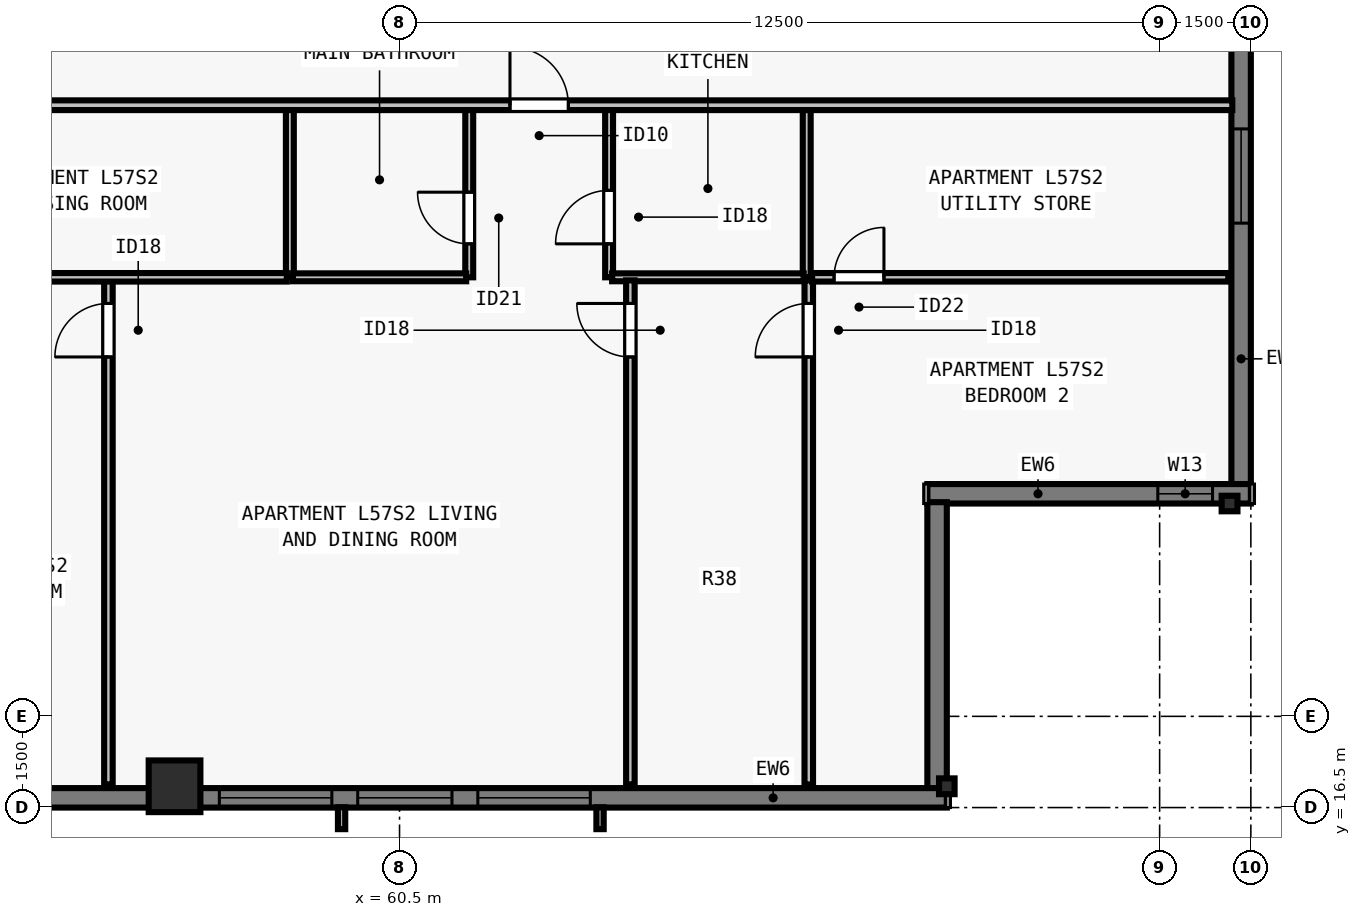
"""IFC4 building model, lengths in metres.
Left out: names, types, materials, properties, quantities, classifications, styles, units other than length and angle.
Written with IfcOpenShell. Run it as: python <this file> out.ifc"""

import sys

from ifc_helpers import new_model, si_unit, direction, frame, frame_2d, origin, origin_2d, place, context, subcontext, project, spatial, rectangle, i_section, extrude, element, fill, save


model = new_model("IFC4")
c1 = context("Model", 3, precision=1e-05, world=origin(), true_north=direction((0.0, 1.0)))
c2 = subcontext(c1, "Body", "Model", "MODEL_VIEW")
j1 = project(units=[si_unit("LENGTHUNIT", "METRE"), si_unit("PLANEANGLEUNIT", "RADIAN")], contexts=[c1])
p1 = place(None, origin())
s1 = spatial("IfcSite", under=j1, at=p1, CompositionType="ELEMENT")
p2 = place(p1, origin())
s2 = spatial("IfcBuilding", under=s1, at=p2, CompositionType="ELEMENT")
p3 = place(p2, frame((0.0, 0.0, 209.5)))
s3 = spatial("IfcBuildingStorey", under=s2, at=p3, CompositionType="ELEMENT", Elevation=209.5)
p4 = place(p3, frame((56.8, 16.85, 0.0), z_axis=(0.0, 0.0, 1.0), x_axis=(1.0, 0.0, 0.0)))
e1 = element("IfcColumn", 1, at=p4, inside=s3, PredefinedType="COLUMN", context=c2, shape_type="SweptSolid", body=[
    extrude(rectangle(XDim=0.85, YDim=0.85, at=origin_2d()), origin(), (0.0, 0.0, 1.0), 3.5),
])
for number, where, z_axis, x_axis in (
    (2, (69.5, 16.85, 0.0), (0.0, 0.0, 1.0), (1.0, 0.0, 0.0)),
    (3, (74.15, 21.5, 0.0), (0.0, 0.0, 1.0), (0.0, 1.0, 0.0)),
):
    element("IfcColumn", number, at=place(p3, frame(where, z_axis=z_axis, x_axis=x_axis)), inside=s3, PredefinedType="COLUMN", context=c2, shape_type="SweptSolid", body=[
        extrude(i_section(OverallWidth=0.256, OverallDepth=0.26, WebThickness=0.01, FlangeThickness=0.017, FilletRadius=0.013, at=origin_2d()), origin(), (0.0, 0.0, 1.0), 3.5),
    ])
p5 = place(p3, frame((74.34, 56.5, 0.0), z_axis=(0.0, 0.0, 1.0), x_axis=(0.0, -1.0, 0.0)))
e4 = element("IfcWall", 4, at=p5, inside=s3, PredefinedType="SOLIDWALL", context=c2, shape_type="SweptSolid", body=[
    extrude(rectangle(XDim=34.702, YDim=0.32, at=frame_2d((17.351, 0.0))), origin(), (0.0, 0.0, 1.0), 3.29),
])
p6 = place(p5, frame((4.163, 0.0, 0.8)))
e5 = element("IfcOpeningElement", 5, at=p6, cuts=e4, PredefinedType="OPENING", context=c2, shape_type="SweptSolid", body=[
    extrude(rectangle(XDim=1.85, YDim=1.678, at=frame_2d((0.925, 0.839))), frame((0.0, 0.17, 0.0), z_axis=(0.0, -1.0, 0.0), x_axis=(1.0, 0.0, 0.0)), (0.0, 0.0, 1.0), 0.34),
])
p7 = place(p5, frame((6.888, 0.0, 0.8)))
e6 = element("IfcOpeningElement", 6, at=p7, cuts=e4, PredefinedType="OPENING", context=c2, shape_type="SweptSolid", body=[
    extrude(rectangle(XDim=1.55, YDim=1.678, at=frame_2d((0.775, 0.839))), frame((0.0, 0.17, 0.0), z_axis=(0.0, -1.0, 0.0), x_axis=(1.0, 0.0, 0.0)), (0.0, 0.0, 1.0), 0.34),
])
p8 = place(p5, frame((10.113, 0.0, 0.8)))
e7 = element("IfcOpeningElement", 7, at=p8, cuts=e4, PredefinedType="OPENING", context=c2, shape_type="SweptSolid", body=[
    extrude(rectangle(XDim=1.85, YDim=1.678, at=frame_2d((0.925, 0.839))), frame((0.0, 0.17, 0.0), z_axis=(0.0, -1.0, 0.0), x_axis=(1.0, 0.0, 0.0)), (0.0, 0.0, 1.0), 0.34),
])
p9 = place(p5, frame((14.888, 0.0, 0.8)))
e8 = element("IfcOpeningElement", 8, at=p9, cuts=e4, PredefinedType="OPENING", context=c2, shape_type="SweptSolid", body=[
    extrude(rectangle(XDim=1.55, YDim=1.678, at=frame_2d((0.775, 0.839))), frame((0.0, 0.17, 0.0), z_axis=(0.0, -1.0, 0.0), x_axis=(1.0, 0.0, 0.0)), (0.0, 0.0, 1.0), 0.34),
])
p10 = place(p5, frame((18.114, 0.0, 0.8)))
e9 = element("IfcOpeningElement", 9, at=p10, cuts=e4, PredefinedType="OPENING", context=c2, shape_type="SweptSolid", body=[
    extrude(rectangle(XDim=1.85, YDim=1.678, at=frame_2d((0.925, 0.839))), frame((0.0, 0.17, 0.0), z_axis=(0.0, -1.0, 0.0), x_axis=(1.0, 0.0, 0.0)), (0.0, 0.0, 1.0), 0.34),
])
p11 = place(p5, frame((23.614, 0.0, 0.8)))
e10 = element("IfcOpeningElement", 10, at=p11, cuts=e4, PredefinedType="OPENING", context=c2, shape_type="SweptSolid", body=[
    extrude(rectangle(XDim=1.85, YDim=1.678, at=frame_2d((0.925, 0.839))), frame((0.0, 0.17, 0.0), z_axis=(0.0, -1.0, 0.0), x_axis=(1.0, 0.0, 0.0)), (0.0, 0.0, 1.0), 0.34),
])
p12 = place(p5, frame((28.839, 0.0, 0.8)))
e11 = element("IfcOpeningElement", 11, at=p12, cuts=e4, PredefinedType="OPENING", context=c2, shape_type="SweptSolid", body=[
    extrude(rectangle(XDim=1.55, YDim=1.678, at=frame_2d((0.775, 0.839))), frame((0.0, 0.17, 0.0), z_axis=(0.0, -1.0, 0.0), x_axis=(1.0, 0.0, 0.0)), (0.0, 0.0, 1.0), 0.34),
])
p13 = place(p3, frame((74.5, 21.66, 0.0), z_axis=(0.0, 0.0, 1.0), x_axis=(-1.0, 0.0, 0.0)))
e12 = element("IfcWall", 12, at=p13, inside=s3, PredefinedType="SOLIDWALL", context=c2, shape_type="SweptSolid", body=[
    extrude(rectangle(XDim=5.32, YDim=0.32, at=frame_2d((2.66, 0.0))), origin(), (0.0, 0.0, 1.0), 3.29),
])
p14 = place(p13, frame((0.63, 0.0, 0.8)))
e13 = element("IfcOpeningElement", 13, at=p14, cuts=e12, PredefinedType="OPENING", context=c2, shape_type="SweptSolid", body=[
    extrude(rectangle(XDim=0.9, YDim=1.678, at=frame_2d((0.45, 0.839))), frame((0.0, 0.17, 0.0), z_axis=(0.0, -1.0, 0.0), x_axis=(1.0, 0.0, 0.0)), (0.0, 0.0, 1.0), 0.34),
])
p15 = place(p3, frame((69.34, 21.522, 0.0), z_axis=(0.0, 0.0, 1.0), x_axis=(0.0, -1.0, 0.0)))
e14 = element("IfcWall", 14, at=p15, inside=s3, PredefinedType="SOLIDWALL", context=c2, shape_type="SweptSolid", body=[
    extrude(rectangle(XDim=4.724, YDim=0.32, at=frame_2d((2.362, 0.0))), origin(), (0.0, 0.0, 1.0), 3.29),
])
p16 = place(p3, frame((69.5, 16.66, 0.0), z_axis=(0.0, 0.0, 1.0), x_axis=(-1.0, 0.0, 0.0)))
e15 = element("IfcWall", 15, at=p16, inside=s3, PredefinedType="SOLIDWALL", context=c2, shape_type="SweptSolid", body=[
    extrude(rectangle(XDim=34.702, YDim=0.32, at=frame_2d((17.351, 0.0))), origin(), (0.0, 0.0, 1.0), 3.29),
])
p17 = place(p16, frame((5.863, 0.0, 0.8)))
e16 = element("IfcOpeningElement", 16, at=p17, cuts=e15, PredefinedType="OPENING", context=c2, shape_type="SweptSolid", body=[
    extrude(rectangle(XDim=1.85, YDim=1.678, at=frame_2d((0.925, 0.839))), frame((0.0, 0.17, 0.0), z_axis=(0.0, -1.0, 0.0), x_axis=(1.0, 0.0, 0.0)), (0.0, 0.0, 1.0), 0.34),
])
p18 = place(p16, frame((8.138, 0.0, 0.8)))
e17 = element("IfcOpeningElement", 17, at=p18, cuts=e15, PredefinedType="OPENING", context=c2, shape_type="SweptSolid", body=[
    extrude(rectangle(XDim=1.55, YDim=1.678, at=frame_2d((0.775, 0.839))), frame((0.0, 0.17, 0.0), z_axis=(0.0, -1.0, 0.0), x_axis=(1.0, 0.0, 0.0)), (0.0, 0.0, 1.0), 0.34),
])
p19 = place(p16, frame((10.113, 0.0, 0.8)))
e18 = element("IfcOpeningElement", 18, at=p19, cuts=e15, PredefinedType="OPENING", context=c2, shape_type="SweptSolid", body=[
    extrude(rectangle(XDim=1.85, YDim=1.678, at=frame_2d((0.925, 0.839))), frame((0.0, 0.17, 0.0), z_axis=(0.0, -1.0, 0.0), x_axis=(1.0, 0.0, 0.0)), (0.0, 0.0, 1.0), 0.34),
])
p20 = place(p16, frame((14.888, 0.0, 0.8)))
e19 = element("IfcOpeningElement", 19, at=p20, cuts=e15, PredefinedType="OPENING", context=c2, shape_type="SweptSolid", body=[
    extrude(rectangle(XDim=1.55, YDim=1.678, at=frame_2d((0.775, 0.839))), frame((0.0, 0.17, 0.0), z_axis=(0.0, -1.0, 0.0), x_axis=(1.0, 0.0, 0.0)), (0.0, 0.0, 1.0), 0.34),
])
p21 = place(p16, frame((18.564, 0.0, 0.8)))
e20 = element("IfcOpeningElement", 20, at=p21, cuts=e15, PredefinedType="OPENING", context=c2, shape_type="SweptSolid", body=[
    extrude(rectangle(XDim=1.85, YDim=1.678, at=frame_2d((0.925, 0.839))), frame((0.0, 0.17, 0.0), z_axis=(0.0, -1.0, 0.0), x_axis=(1.0, 0.0, 0.0)), (0.0, 0.0, 1.0), 0.34),
])
p22 = place(p16, frame((24.414, 0.0, 0.8)))
e21 = element("IfcOpeningElement", 21, at=p22, cuts=e15, PredefinedType="OPENING", context=c2, shape_type="SweptSolid", body=[
    extrude(rectangle(XDim=1.85, YDim=1.678, at=frame_2d((0.925, 0.839))), frame((0.0, 0.17, 0.0), z_axis=(0.0, -1.0, 0.0), x_axis=(1.0, 0.0, 0.0)), (0.0, 0.0, 1.0), 0.34),
])
p23 = place(p16, frame((28.389, 0.0, 0.8)))
e22 = element("IfcOpeningElement", 22, at=p23, cuts=e15, PredefinedType="OPENING", context=c2, shape_type="SweptSolid", body=[
    extrude(rectangle(XDim=1.55, YDim=1.678, at=frame_2d((0.775, 0.839))), frame((0.0, 0.17, 0.0), z_axis=(0.0, -1.0, 0.0), x_axis=(1.0, 0.0, 0.0)), (0.0, 0.0, 1.0), 0.34),
])
p24 = place(p3, frame((29.805, 28.05, 0.0), z_axis=(0.0, 0.0, 1.0), x_axis=(1.0, 0.0, 0.0)))
e23 = element("IfcWall", 23, at=p24, inside=s3, PredefinedType="PARTITIONING", context=c2, shape_type="SweptSolid", body=[
    extrude(rectangle(XDim=44.39, YDim=0.16, at=frame_2d((22.195, 0.0))), origin(), (0.0, 0.0, 1.0), 2.958),
])
p25 = place(p24, frame((10.431, 0.0, 0.0)))
e24 = element("IfcOpeningElement", 24, at=p25, cuts=e23, PredefinedType="OPENING", context=c2, shape_type="SweptSolid", body=[
    extrude(rectangle(XDim=0.96, YDim=2.18, at=frame_2d((0.48, 1.09))), frame((0.0, 0.09, 0.0), z_axis=(0.0, -1.0, 0.0), x_axis=(1.0, 0.0, 0.0)), (0.0, 0.0, 1.0), 0.18),
])
p26 = place(p24, frame((32.511, 0.0, 0.0)))
e25 = element("IfcOpeningElement", 25, at=p26, cuts=e23, PredefinedType="OPENING", context=c2, shape_type="SweptSolid", body=[
    extrude(rectangle(XDim=0.96, YDim=2.18, at=frame_2d((0.48, 1.09))), frame((0.0, 0.09, 0.0), z_axis=(0.0, -1.0, 0.0), x_axis=(1.0, 0.0, 0.0)), (0.0, 0.0, 1.0), 0.18),
])
p27 = place(p3, frame((58.696, 25.22, 0.0), z_axis=(0.0, 0.0, 1.0), x_axis=(0.0, 1.0, 0.0)))
e26 = element("IfcWall", 26, at=p27, inside=s3, PredefinedType="PLUMBINGWALL", context=c2, shape_type="SweptSolid", body=[
    extrude(rectangle(XDim=2.75, YDim=0.13, at=frame_2d((1.375, 0.0))), origin(), (0.0, 0.0, 1.0), 3.29),
])
p28 = place(p3, frame((61.646, 25.22, 0.0), z_axis=(0.0, 0.0, 1.0), x_axis=(0.0, 1.0, 0.0)))
e27 = element("IfcWall", 27, at=p28, inside=s3, PredefinedType="PLUMBINGWALL", context=c2, shape_type="SweptSolid", body=[
    extrude(rectangle(XDim=2.75, YDim=0.13, at=frame_2d((1.375, 0.0))), origin(), (0.0, 0.0, 1.0), 3.29),
])
p29 = place(p28, frame((0.55, 0.0, 0.0)))
e28 = element("IfcOpeningElement", 28, at=p29, cuts=e27, PredefinedType="OPENING", context=c2, shape_type="SweptSolid", body=[
    extrude(rectangle(XDim=0.85, YDim=2.08, at=frame_2d((0.425, 1.04))), frame((0.0, 0.075, 0.0), z_axis=(0.0, -1.0, 0.0), x_axis=(1.0, 0.0, 0.0)), (0.0, 0.0, 1.0), 0.15),
])
p30 = place(p3, frame((58.746, 25.22, 0.0), z_axis=(0.0, 0.0, 1.0), x_axis=(1.0, 0.0, 0.0)))
e29 = element("IfcWall", 29, at=p30, inside=s3, PredefinedType="PLUMBINGWALL", context=c2, shape_type="SweptSolid", body=[
    extrude(rectangle(XDim=2.85, YDim=0.13, at=frame_2d((1.425, 0.0))), origin(), (0.0, 0.0, 1.0), 3.29),
])
p31 = place(p3, frame((67.196, 25.22, 0.0), z_axis=(0.0, 0.0, 1.0), x_axis=(0.0, 1.0, 0.0)))
e30 = element("IfcWall", 30, at=p31, inside=s3, PredefinedType="PLUMBINGWALL", context=c2, shape_type="SweptSolid", body=[
    extrude(rectangle(XDim=2.75, YDim=0.13, at=frame_2d((1.375, 0.0))), origin(), (0.0, 0.0, 1.0), 3.29),
])
p32 = place(p3, frame((63.946, 25.22, 0.0), z_axis=(0.0, 0.0, 1.0), x_axis=(0.0, 1.0, 0.0)))
e31 = element("IfcWall", 31, at=p32, inside=s3, PredefinedType="PLUMBINGWALL", context=c2, shape_type="SweptSolid", body=[
    extrude(rectangle(XDim=2.75, YDim=0.13, at=frame_2d((1.375, 0.0))), origin(), (0.0, 0.0, 1.0), 2.573),
])
p33 = place(p32, frame((0.55, 0.0, 0.0)))
e32 = element("IfcOpeningElement", 32, at=p33, cuts=e31, PredefinedType="OPENING", context=c2, shape_type="SweptSolid", body=[
    extrude(rectangle(XDim=0.88, YDim=2.1, at=frame_2d((0.44, 1.05))), frame((0.0, 0.075, 0.0), z_axis=(0.0, -1.0, 0.0), x_axis=(1.0, 0.0, 0.0)), (0.0, 0.0, 1.0), 0.15),
])
p34 = place(p3, frame((63.996, 25.22, 0.0), z_axis=(0.0, 0.0, 1.0), x_axis=(1.0, 0.0, 0.0)))
e33 = element("IfcWall", 33, at=p34, inside=s3, PredefinedType="PLUMBINGWALL", context=c2, shape_type="SweptSolid", body=[
    extrude(rectangle(XDim=3.15, YDim=0.13, at=frame_2d((1.575, 0.0))), origin(), (0.0, 0.0, 1.0), 3.29),
])
p35 = place(p3, frame((55.712, 16.88, 0.0), z_axis=(0.0, 0.0, 1.0), x_axis=(0.0, 1.0, 0.0)))
e34 = element("IfcWall", 34, at=p35, inside=s3, PredefinedType="PARTITIONING", context=c2, shape_type="SweptSolid", body=[
    extrude(rectangle(XDim=8.38, YDim=0.14, at=frame_2d((4.19, 0.0))), origin(), (0.0, 0.0, 1.0), 3.29),
])
p36 = place(p35, frame((7.03, 0.0, 0.0)))
e35 = element("IfcOpeningElement", 35, at=p36, cuts=e34, PredefinedType="OPENING", context=c2, shape_type="SweptSolid", body=[
    extrude(rectangle(XDim=0.88, YDim=2.1, at=frame_2d((0.44, 1.05))), frame((0.0, 0.08, 0.0), z_axis=(0.0, -1.0, 0.0), x_axis=(1.0, 0.0, 0.0)), (0.0, 0.0, 1.0), 0.16),
])
p37 = place(p3, frame((51.577, 25.22, 0.0), z_axis=(0.0, 0.0, 1.0), x_axis=(1.0, 0.0, 0.0)))
e36 = element("IfcWall", 36, at=p37, inside=s3, PredefinedType="PARTITIONING", context=c2, shape_type="SweptSolid", body=[
    extrude(rectangle(XDim=7.069, YDim=0.14, at=frame_2d((3.534, 0.0))), origin(), (0.0, 0.0, 1.0), 3.29),
])
p38 = place(p37, frame((0.335, 0.0, 0.0)))
e37 = element("IfcOpeningElement", 37, at=p38, cuts=e36, PredefinedType="OPENING", context=c2, shape_type="SweptSolid", body=[
    extrude(rectangle(XDim=0.82, YDim=2.1, at=frame_2d((0.41, 1.05))), frame((0.0, 0.08, 0.0), z_axis=(0.0, -1.0, 0.0), x_axis=(1.0, 0.0, 0.0)), (0.0, 0.0, 1.0), 0.16),
])
p39 = place(p3, frame((67.23, 16.88, 0.0), z_axis=(0.0, 0.0, 1.0), x_axis=(0.0, 1.0, 0.0)))
e38 = element("IfcWall", 38, at=p39, inside=s3, PredefinedType="PARTITIONING", context=c2, shape_type="SweptSolid", body=[
    extrude(rectangle(XDim=8.29, YDim=0.14, at=frame_2d((4.145, 0.0))), origin(), (0.0, 0.0, 1.0), 2.573),
])
p40 = place(p39, frame((7.03, 0.0, 0.0)))
e39 = element("IfcOpeningElement", 39, at=p40, cuts=e38, PredefinedType="OPENING", context=c2, shape_type="SweptSolid", body=[
    extrude(rectangle(XDim=0.88, YDim=2.1, at=frame_2d((0.44, 1.05))), frame((0.0, 0.08, 0.0), z_axis=(0.0, -1.0, 0.0), x_axis=(1.0, 0.0, 0.0)), (0.0, 0.0, 1.0), 0.16),
])
p41 = place(p3, frame((67.285, 25.22, 0.0), z_axis=(0.0, 0.0, 1.0), x_axis=(1.0, 0.0, 0.0)))
e40 = element("IfcWall", 40, at=p41, inside=s3, PredefinedType="PARTITIONING", context=c2, shape_type="SweptSolid", body=[
    extrude(rectangle(XDim=6.845, YDim=0.14, at=frame_2d((3.422, 0.0))), origin(), (0.0, 0.0, 1.0), 2.958),
])
p42 = place(p41, frame((0.361, 0.0, 0.0)))
e41 = element("IfcOpeningElement", 41, at=p42, cuts=e40, PredefinedType="OPENING", context=c2, shape_type="SweptSolid", body=[
    extrude(rectangle(XDim=0.82, YDim=2.1, at=frame_2d((0.41, 1.05))), frame((0.0, 0.08, 0.0), z_axis=(0.0, -1.0, 0.0), x_axis=(1.0, 0.0, 0.0)), (0.0, 0.0, 1.0), 0.16),
])
p43 = place(p3, frame((64.296, 16.88, 0.0), z_axis=(0.0, 0.0, 1.0), x_axis=(0.0, 1.0, 0.0)))
e42 = element("IfcWall", 42, at=p43, inside=s3, PredefinedType="PARTITIONING", context=c2, shape_type="SweptSolid", body=[
    extrude(rectangle(XDim=8.29, YDim=0.14, at=frame_2d((4.145, 0.0))), origin(), (0.0, 0.0, 1.0), 2.573),
])
p44 = place(p43, frame((7.03, 0.0, 0.0)))
e43 = element("IfcOpeningElement", 43, at=p44, cuts=e42, PredefinedType="OPENING", context=c2, shape_type="SweptSolid", body=[
    extrude(rectangle(XDim=0.88, YDim=2.1, at=frame_2d((0.44, 1.05))), frame((0.0, 0.08, 0.0), z_axis=(0.0, -1.0, 0.0), x_axis=(1.0, 0.0, 0.0)), (0.0, 0.0, 1.0), 0.16),
])
p45 = place(p12, origin())
e44 = element("IfcWindow", 44, at=p45, inside=s3, PartitioningType="SINGLE_PANEL", PredefinedType="WINDOW", context=c2, shape_type="SweptSolid", body=[
    extrude(rectangle(XDim=1.55, YDim=1.678, at=frame_2d((0.775, 0.839))), frame((0.0, -0.05, 0.0), z_axis=(0.0, -1.0, 0.0), x_axis=(1.0, 0.0, 0.0)), (0.0, 0.0, 1.0), 0.06),
])
fill(e11, e44)
p46 = place(p17, origin())
e45 = element("IfcWindow", 45, at=p46, inside=s3, PartitioningType="SINGLE_PANEL", PredefinedType="WINDOW", context=c2, shape_type="SweptSolid", body=[
    extrude(rectangle(XDim=1.85, YDim=1.678, at=frame_2d((0.925, 0.839))), frame((0.0, -0.05, 0.0), z_axis=(0.0, -1.0, 0.0), x_axis=(1.0, 0.0, 0.0)), (0.0, 0.0, 1.0), 0.06),
])
fill(e16, e45)
p47 = place(p18, origin())
e46 = element("IfcWindow", 46, at=p47, inside=s3, PartitioningType="SINGLE_PANEL", PredefinedType="WINDOW", context=c2, shape_type="SweptSolid", body=[
    extrude(rectangle(XDim=1.55, YDim=1.678, at=frame_2d((0.775, 0.839))), frame((0.0, -0.05, 0.0), z_axis=(0.0, -1.0, 0.0), x_axis=(1.0, 0.0, 0.0)), (0.0, 0.0, 1.0), 0.06),
])
fill(e17, e46)
p48 = place(p19, origin())
e47 = element("IfcWindow", 47, at=p48, inside=s3, PartitioningType="SINGLE_PANEL", PredefinedType="WINDOW", context=c2, shape_type="SweptSolid", body=[
    extrude(rectangle(XDim=1.85, YDim=1.678, at=frame_2d((0.925, 0.839))), frame((0.0, -0.05, 0.0), z_axis=(0.0, -1.0, 0.0), x_axis=(1.0, 0.0, 0.0)), (0.0, 0.0, 1.0), 0.06),
])
fill(e18, e47)
p49 = place(p14, origin())
e48 = element("IfcWindow", 48, at=p49, inside=s3, PartitioningType="SINGLE_PANEL", PredefinedType="WINDOW", context=c2, shape_type="SweptSolid", body=[
    extrude(rectangle(XDim=0.9, YDim=1.678, at=frame_2d((0.45, 0.839))), frame((0.0, -0.04, 0.0), z_axis=(0.0, -1.0, 0.0), x_axis=(1.0, 0.0, 0.0)), (0.0, 0.0, 1.0), 0.06),
])
fill(e13, e48)
p50 = place(p29, origin())
e49 = element("IfcDoor", 49, at=p50, inside=s3, OperationType="SINGLE_SWING_RIGHT", PredefinedType="DOOR", context=c2, shape_type="SweptSolid", body=[
    extrude(rectangle(XDim=0.85, YDim=2.08, at=frame_2d((0.425, 1.04))), frame((0.0, 0.025, 0.0), z_axis=(0.0, -1.0, 0.0), x_axis=(1.0, 0.0, 0.0)), (0.0, 0.0, 1.0), 0.05),
])
fill(e28, e49)
p51 = place(p33, origin())
e50 = element("IfcDoor", 50, at=p51, inside=s3, OperationType="SINGLE_SWING_LEFT", PredefinedType="DOOR", context=c2, shape_type="SweptSolid", body=[
    extrude(rectangle(XDim=0.88, YDim=2.1, at=frame_2d((0.44, 1.05))), frame((0.0, 0.025, 0.0), z_axis=(0.0, -1.0, 0.0), x_axis=(1.0, 0.0, 0.0)), (0.0, 0.0, 1.0), 0.05),
])
fill(e32, e50)
p52 = place(p36, origin())
e51 = element("IfcDoor", 51, at=p52, inside=s3, OperationType="SINGLE_SWING_LEFT", PredefinedType="DOOR", context=c2, shape_type="SweptSolid", body=[
    extrude(rectangle(XDim=0.88, YDim=2.1, at=frame_2d((0.44, 1.05))), frame((0.0, 0.025, 0.0), z_axis=(0.0, -1.0, 0.0), x_axis=(1.0, 0.0, 0.0)), (0.0, 0.0, 1.0), 0.05),
])
fill(e35, e51)
p53 = place(p42, origin())
e52 = element("IfcDoor", 52, at=p53, inside=s3, OperationType="SINGLE_SWING_RIGHT", PredefinedType="DOOR", context=c2, shape_type="SweptSolid", body=[
    extrude(rectangle(XDim=0.82, YDim=2.1, at=frame_2d((0.41, 1.05))), frame((0.0, 0.025, 0.0), z_axis=(0.0, -1.0, 0.0), x_axis=(1.0, 0.0, 0.0)), (0.0, 0.0, 1.0), 0.05),
])
fill(e41, e52)
p54 = place(p40, origin())
e53 = element("IfcDoor", 53, at=p54, inside=s3, OperationType="SINGLE_SWING_LEFT", PredefinedType="DOOR", context=c2, shape_type="SweptSolid", body=[
    extrude(rectangle(XDim=0.88, YDim=2.1, at=frame_2d((0.44, 1.05))), frame((0.0, 0.025, 0.0), z_axis=(0.0, -1.0, 0.0), x_axis=(1.0, 0.0, 0.0)), (0.0, 0.0, 1.0), 0.05),
])
fill(e39, e53)
p55 = place(p44, origin())
e54 = element("IfcDoor", 54, at=p55, inside=s3, OperationType="SINGLE_SWING_RIGHT", PredefinedType="DOOR", context=c2, shape_type="SweptSolid", body=[
    extrude(rectangle(XDim=0.88, YDim=2.1, at=frame_2d((0.44, 1.05))), frame((0.0, 0.025, 0.0), z_axis=(0.0, -1.0, 0.0), x_axis=(1.0, 0.0, 0.0)), (0.0, 0.0, 1.0), 0.05),
])
fill(e43, e54)
p56 = place(p26, origin())
e55 = element("IfcDoor", 55, at=p56, inside=s3, OperationType="SINGLE_SWING_LEFT", PredefinedType="DOOR", context=c2, shape_type="SweptSolid", body=[
    extrude(rectangle(XDim=0.96, YDim=2.18, at=frame_2d((0.48, 1.09))), frame((0.0, 0.025, 0.0), z_axis=(0.0, -1.0, 0.0), x_axis=(1.0, 0.0, 0.0)), (0.0, 0.0, 1.0), 0.05),
])
fill(e25, e55)
save(model, sys.argv[1])
